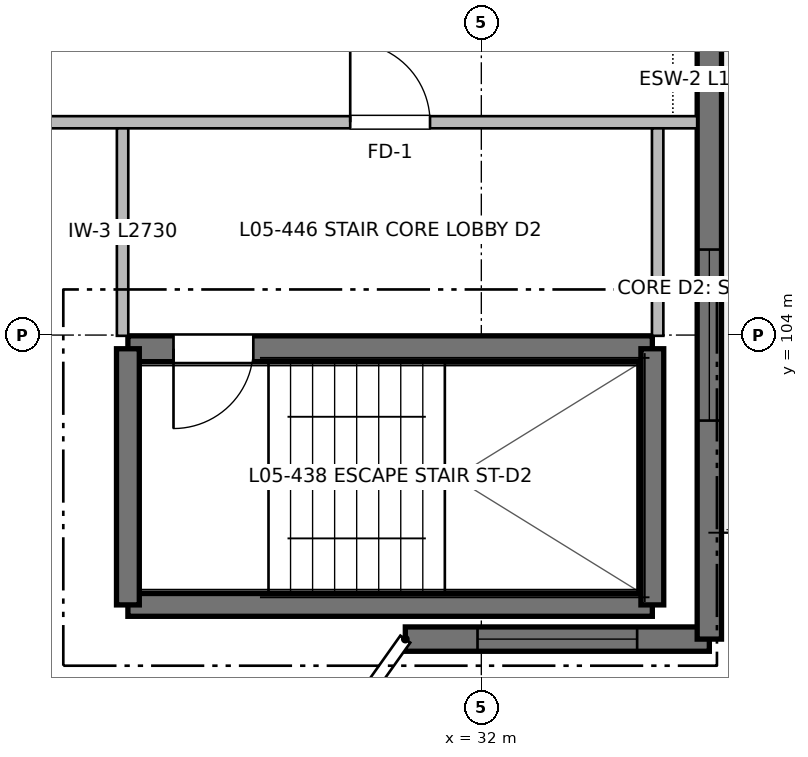
"""IFC4 building model, lengths in metres.
Left out: names, types, materials, properties, quantities, classifications, styles, units other than length and angle.
Written with IfcOpenShell. Run it as: python <this file> out.ifc"""

import sys

from ifc_helpers import new_model, si_unit, direction, frame, frame_2d, origin, place, context, subcontext, project, spatial, rectangle, extrude, element, fill, save


model = new_model("IFC4")
c1 = context("Model", 3, precision=1e-05, world=origin(), true_north=direction((0.0, 1.0)))
c2 = subcontext(c1, "Body", "Model", "MODEL_VIEW")
j1 = project(units=[si_unit("LENGTHUNIT", "METRE"), si_unit("PLANEANGLEUNIT", "RADIAN")], contexts=[c1])
p1 = place(None, origin())
s1 = spatial("IfcSite", under=j1, at=p1, CompositionType="ELEMENT")
p2 = place(p1, origin())
s2 = spatial("IfcBuilding", under=s1, at=p2, CompositionType="ELEMENT")
p3 = place(p2, frame((0.0, 0.0, 16.96)))
s3 = spatial("IfcBuildingStorey", under=s2, at=p3, CompositionType="ELEMENT", Elevation=16.96)
p4 = place(p3, frame((27.35, 100.45, 0.0), z_axis=(0.0, 0.0, 1.0), x_axis=(1.0, 0.0, 0.0)))
e1 = element("IfcWall", 1, at=p4, inside=s3, PredefinedType="SHEAR", context=c2, shape_type="SweptSolid", body=[
    extrude(rectangle(XDim=6.9, YDim=0.3, at=frame_2d((3.45, 0.0))), origin(), (0.0, 0.0, 1.0), 3.2),
])
p5 = place(p3, frame((34.25, 103.82, 0.0), z_axis=(0.0, 0.0, 1.0), x_axis=(-1.0, 0.0, 0.0)))
e2 = element("IfcWall", 2, at=p5, inside=s3, PredefinedType="SHEAR", context=c2, shape_type="SweptSolid", body=[
    extrude(rectangle(XDim=6.9, YDim=0.34, at=frame_2d((3.45, 0.0))), origin(), (0.0, 0.0, 1.0), 3.2),
])
p6 = place(p5, frame((5.25, 0.0, 0.0)))
e3 = element("IfcOpeningElement", 3, at=p6, cuts=e2, PredefinedType="OPENING", context=c2, shape_type="SweptSolid", body=[
    extrude(rectangle(XDim=1.05, YDim=2.15, at=frame_2d((0.525, 1.075))), frame((0.0, 0.18, 0.0), z_axis=(0.0, -1.0, 0.0), x_axis=(1.0, 0.0, 0.0)), (0.0, 0.0, 1.0), 0.36),
])
for number, where, z_axis, x_axis in (
    (4, (27.35, 103.82, 0.0), (0.0, 0.0, 1.0), (0.0, -1.0, 0.0)),
    (5, (34.25, 100.45, 0.0), (0.0, 0.0, 1.0), (0.0, 1.0, 0.0)),
):
    element("IfcWall", number, at=place(p3, frame(where, z_axis=z_axis, x_axis=x_axis)), inside=s3, PredefinedType="SHEAR", context=c2, shape_type="SweptSolid", body=[
        extrude(rectangle(XDim=3.37, YDim=0.3, at=frame_2d((1.685, 0.0))), origin(), (0.0, 0.0, 1.0), 3.2),
    ])
p7 = place(p3, frame((35.0, 100.0, 0.0), z_axis=(0.0, 0.0, 1.0), x_axis=(-1.0, 0.0, 0.0)))
e6 = element("IfcWall", 6, at=p7, inside=s3, PredefinedType="SHEAR", context=c2, shape_type="SweptSolid", body=[
    extrude(rectangle(XDim=4.0, YDim=0.32, at=frame_2d((2.0, 0.0))), origin(), (0.0, 0.0, 1.0), 2.98),
])
p8 = place(p7, frame((0.95, 0.0, 0.67)))
e7 = element("IfcOpeningElement", 7, at=p8, cuts=e6, PredefinedType="OPENING", context=c2, shape_type="SweptSolid", body=[
    extrude(rectangle(XDim=2.1, YDim=1.55, at=frame_2d((1.05, 0.775))), frame((0.0, 0.17, 0.0), z_axis=(0.0, -1.0, 0.0), x_axis=(1.0, 0.0, 0.0)), (0.0, 0.0, 1.0), 0.34),
])
p9 = place(p3, frame((35.0, 116.0, 0.0), z_axis=(0.0, 0.0, 1.0), x_axis=(0.0, -1.0, 0.0)))
e8 = element("IfcWall", 8, at=p9, inside=s3, PredefinedType="SHEAR", context=c2, shape_type="SweptSolid", body=[
    extrude(rectangle(XDim=16.0, YDim=0.32, at=frame_2d((8.0, 0.0))), origin(), (0.0, 0.0, 1.0), 2.98),
])
p10 = place(p9, frame((2.95, 0.0, 0.0)))
e9 = element("IfcOpeningElement", 9, at=p10, cuts=e8, PredefinedType="OPENING", context=c2, shape_type="SweptSolid", body=[
    extrude(rectangle(XDim=1.2, YDim=2.2, at=frame_2d((0.6, 1.1))), frame((0.0, 0.17, 0.0), z_axis=(0.0, -1.0, 0.0), x_axis=(1.0, 0.0, 0.0)), (0.0, 0.0, 1.0), 0.34),
])
p11 = place(p9, frame((5.3, 0.0, 0.62)))
e10 = element("IfcOpeningElement", 10, at=p11, cuts=e8, PredefinedType="OPENING", context=c2, shape_type="SweptSolid", body=[
    extrude(rectangle(XDim=1.1, YDim=1.6, at=frame_2d((0.55, 0.8))), frame((0.0, 0.17, 0.0), z_axis=(0.0, -1.0, 0.0), x_axis=(1.0, 0.0, 0.0)), (0.0, 0.0, 1.0), 0.34),
])
p12 = place(p9, frame((10.875, 0.0, 0.72)))
e11 = element("IfcOpeningElement", 11, at=p12, cuts=e8, PredefinedType="OPENING", context=c2, shape_type="SweptSolid", body=[
    extrude(rectangle(XDim=2.25, YDim=1.5, at=frame_2d((1.125, 0.75))), frame((0.0, 0.17, 0.0), z_axis=(0.0, -1.0, 0.0), x_axis=(1.0, 0.0, 0.0)), (0.0, 0.0, 1.0), 0.34),
])
p13 = place(p3, frame((17.2, 106.8, 0.0), z_axis=(0.0, 0.0, 1.0), x_axis=(1.0, 0.0, 0.0)))
e12 = element("IfcWall", 12, at=p13, inside=s3, PredefinedType="PARTITIONING", context=c2, shape_type="SweptSolid", body=[
    extrude(rectangle(XDim=17.64, YDim=0.16, at=frame_2d((8.82, 0.0))), origin(), (0.0, 0.0, 1.0), 2.935),
])
p14 = place(p13, frame((13.075, 0.0, 0.0)))
e13 = element("IfcOpeningElement", 13, at=p14, cuts=e12, PredefinedType="OPENING", context=c2, shape_type="SweptSolid", body=[
    extrude(rectangle(XDim=1.05, YDim=2.15, at=frame_2d((0.525, 1.075))), frame((0.0, 0.09, 0.0), z_axis=(0.0, -1.0, 0.0), x_axis=(1.0, 0.0, 0.0)), (0.0, 0.0, 1.0), 0.18),
])
for number, where, z_axis, x_axis in (
    (14, (27.28, 103.99, 0.0), (0.0, 0.0, 1.0), (0.0, 1.0, 0.0)),
    (15, (34.32, 103.99, 0.0), (0.0, 0.0, 1.0), (0.0, 1.0, 0.0)),
):
    element("IfcWall", number, at=place(p3, frame(where, z_axis=z_axis, x_axis=x_axis)), inside=s3, PredefinedType="PARTITIONING", context=c2, shape_type="SweptSolid", body=[
        extrude(rectangle(XDim=2.73, YDim=0.15, at=frame_2d((1.365, 0.0))), origin(), (0.0, 0.0, 1.0), 2.935),
    ])
p15 = place(p6, origin())
e16 = element("IfcDoor", 16, at=p15, inside=s3, OperationType="SINGLE_SWING_RIGHT", PredefinedType="DOOR", context=c2, shape_type="SweptSolid", body=[
    extrude(rectangle(XDim=1.05, YDim=2.15, at=frame_2d((0.525, 1.075))), frame((0.0, 0.025, 0.0), z_axis=(0.0, -1.0, 0.0), x_axis=(1.0, 0.0, 0.0)), (0.0, 0.0, 1.0), 0.05),
])
fill(e3, e16)
p16 = place(p8, origin())
e17 = element("IfcWindow", 17, at=p16, inside=s3, PartitioningType="SINGLE_PANEL", PredefinedType="WINDOW", context=c2, shape_type="SweptSolid", body=[
    extrude(rectangle(XDim=2.1, YDim=1.55, at=frame_2d((1.05, 0.775))), frame((0.0, 0.03, 0.0), z_axis=(0.0, -1.0, 0.0), x_axis=(1.0, 0.0, 0.0)), (0.0, 0.0, 1.0), 0.06),
])
fill(e7, e17)
p17 = place(p12, origin())
e18 = element("IfcWindow", 18, at=p17, inside=s3, PartitioningType="SINGLE_PANEL", PredefinedType="WINDOW", context=c2, shape_type="SweptSolid", body=[
    extrude(rectangle(XDim=2.25, YDim=1.5, at=frame_2d((1.125, 0.75))), frame((0.0, 0.03, 0.0), z_axis=(0.0, -1.0, 0.0), x_axis=(1.0, 0.0, 0.0)), (0.0, 0.0, 1.0), 0.06),
])
fill(e11, e18)
p18 = place(p14, origin())
e19 = element("IfcDoor", 19, at=p18, inside=s3, OperationType="SINGLE_SWING_LEFT", PredefinedType="DOOR", context=c2, shape_type="SweptSolid", body=[
    extrude(rectangle(XDim=1.05, YDim=2.15, at=frame_2d((0.525, 1.075))), frame((0.0, 0.025, 0.0), z_axis=(0.0, -1.0, 0.0), x_axis=(1.0, 0.0, 0.0)), (0.0, 0.0, 1.0), 0.05),
])
fill(e13, e19)
save(model, sys.argv[1])
